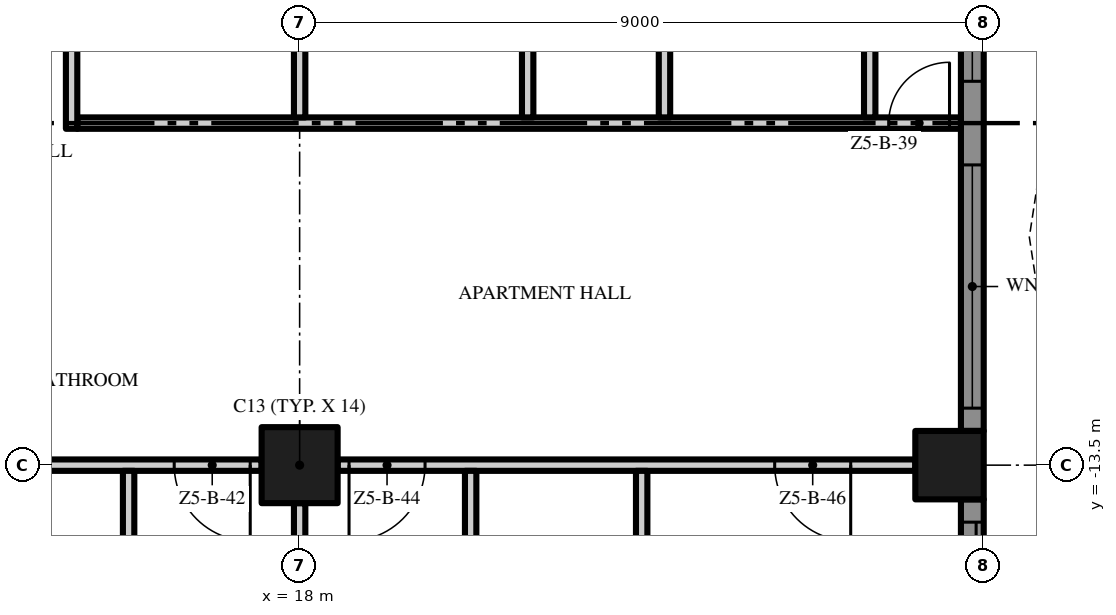
"""IFC4 building model, lengths in metres.
Left out: names, types, materials, properties, quantities, classifications, styles, units other than length and angle.
Written with IfcOpenShell. Run it as: python <this file> out.ifc"""

import sys

from ifc_helpers import new_model, si_unit, direction, frame, frame_2d, origin, origin_2d, place, context, subcontext, project, spatial, polyline, rectangle, outline, extrude, element, fill, save


model = new_model("IFC4")
c1 = context("Model", 3, precision=1e-05, world=origin(), true_north=direction((0.0, 1.0)))
c2 = subcontext(c1, "Body", "Model", "MODEL_VIEW")
j1 = project(units=[si_unit("LENGTHUNIT", "METRE"), si_unit("PLANEANGLEUNIT", "RADIAN")], contexts=[c1])
p1 = place(None, origin())
s1 = spatial("IfcSite", under=j1, at=p1, CompositionType="ELEMENT")
p2 = place(p1, origin())
s2 = spatial("IfcBuilding", under=s1, at=p2, CompositionType="ELEMENT")
p3 = place(p2, frame((0.0, 0.0, 250.2)))
s3 = spatial("IfcBuildingStorey", under=s2, at=p3, CompositionType="ELEMENT", Elevation=250.2)
p4 = place(p3, frame((18.0, -13.5, 0.0), z_axis=(0.0, 0.0, 1.0), x_axis=(1.0, 0.0, 0.0)))
e1 = element("IfcColumn", 1, at=p4, inside=s3, PredefinedType="COLUMN", context=c2, shape_type="SweptSolid", body=[
    extrude(rectangle(XDim=1.0, YDim=1.0, at=origin_2d()), origin(), (0.0, 0.0, 1.0), 3.5),
])
p5 = place(p3, frame((26.55, -13.5, 0.0), z_axis=(0.0, 0.0, 1.0), x_axis=(1.0, 0.0, 0.0)))
e2 = element("IfcColumn", 2, at=p5, inside=s3, PredefinedType="COLUMN", context=c2, shape_type="SweptSolid", body=[
    extrude(rectangle(XDim=0.9, YDim=0.9, at=origin_2d()), origin(), (0.0, 0.0, 1.0), 3.5),
])
p6 = place(p3, frame((26.85, -13.95, 0.0), z_axis=(0.0, 0.0, 1.0), x_axis=(0.0, -1.0, 0.0)))
e3 = element("IfcWall", 3, at=p6, inside=s3, PredefinedType="SOLIDWALL", context=c2, shape_type="SweptSolid", body=[
    extrude(rectangle(XDim=3.75, YDim=0.3, at=frame_2d((1.875, 0.0))), origin(), (0.0, 0.0, 1.0), 3.5),
])
p7 = place(p6, frame((0.3, 0.0, 0.0)))
e4 = element("IfcOpeningElement", 4, at=p7, cuts=e3, PredefinedType="OPENING", context=c2, shape_type="SweptSolid", body=[
    extrude(rectangle(XDim=3.15, YDim=2.4, at=frame_2d((1.575, 1.2))), frame((0.0, 0.16, 0.0), z_axis=(0.0, -1.0, 0.0), x_axis=(1.0, 0.0, 0.0)), (0.0, 0.0, 1.0), 0.32),
])
p8 = place(p3, frame((26.85, -4.95, 0.0), z_axis=(0.0, 0.0, 1.0), x_axis=(0.0, -1.0, 0.0)))
e5 = element("IfcWall", 5, at=p8, inside=s3, PredefinedType="SOLIDWALL", context=c2, shape_type="SweptSolid", body=[
    extrude(rectangle(XDim=8.1, YDim=0.3, at=frame_2d((4.05, 0.0))), origin(), (0.0, 0.0, 1.0), 3.5),
])
p9 = place(p8, frame((4.6, 0.0, 0.45)))
e6 = element("IfcOpeningElement", 6, at=p9, cuts=e5, PredefinedType="OPENING", context=c2, shape_type="SweptSolid", body=[
    extrude(rectangle(XDim=3.2, YDim=2.65, at=frame_2d((1.6, 1.325))), frame((0.0, 0.16, 0.0), z_axis=(0.0, -1.0, 0.0), x_axis=(1.0, 0.0, 0.0)), (0.0, 0.0, 1.0), 0.32),
])
p10 = place(p8, frame((0.3, 0.0, 0.45)))
e7 = element("IfcOpeningElement", 7, at=p10, cuts=e5, PredefinedType="OPENING", context=c2, shape_type="SweptSolid", body=[
    extrude(rectangle(XDim=3.2, YDim=2.65, at=frame_2d((1.6, 1.325))), frame((0.0, 0.16, 0.0), z_axis=(0.0, -1.0, 0.0), x_axis=(1.0, 0.0, 0.0)), (0.0, 0.0, 1.0), 0.32),
])
p11 = place(p3, origin())
e8 = element("IfcWall", 8, at=p11, inside=s3, PredefinedType="USERDEFINED", context=c2, shape_type="SweptSolid", body=[
    extrude(outline(polyline([(30.0, -18.0), (29.771, -16.5), (29.171, -15.0), (28.429, -13.5), (27.829, -12.0), (27.6, -10.5), (27.829, -9.0), (28.429, -7.5), (29.171, -6.0), (29.771, -4.5), (30.0, -3.0), (29.771, -1.5), (29.171, 0.0), (28.429, 1.5), (27.829, 3.0), (27.6, 4.5), (27.829, 6.0), (28.429, 7.5), (29.171, 9.0), (29.771, 10.5), (30.0, 12.0), (29.771, 13.5), (29.171, 15.0), (28.429, 16.5), (27.829, 18.0), (27.597, 17.907), (28.201, 16.398), (28.942, 14.898), (29.528, 13.434), (29.747, 12.0), (29.528, 10.566), (28.942, 9.102), (28.201, 7.602), (27.586, 6.066), (27.347, 4.5), (27.586, 2.934), (28.201, 1.398), (28.942, -0.102), (29.528, -1.566), (29.747, -3.0), (29.528, -4.434), (28.942, -5.898), (28.201, -7.398), (27.586, -8.934), (27.347, -10.5), (27.586, -12.066), (28.201, -13.602), (28.942, -15.102), (29.528, -16.566), (29.753, -18.038), (30.0, -18.0)])), origin(), (0.0, 0.0, 1.0), 0.9),
])
p12 = place(p3, frame((17.5, -13.5, 0.0), z_axis=(0.0, 0.0, 1.0), x_axis=(-1.0, 0.0, 0.0)))
e9 = element("IfcWall", 9, at=p12, inside=s3, PredefinedType="PARTITIONING", context=c2, shape_type="SweptSolid", body=[
    extrude(rectangle(XDim=8.0, YDim=0.15, at=frame_2d((4.0, 0.0))), origin(), (0.0, 0.0, 1.0), 3.5),
])
p13 = place(p12, frame((6.05, 0.0, 0.0)))
e10 = element("IfcOpeningElement", 10, at=p13, cuts=e9, PredefinedType="OPENING", context=c2, shape_type="SweptSolid", body=[
    extrude(rectangle(XDim=1.8, YDim=2.4, at=frame_2d((0.9, 1.2))), frame((0.0, 0.085, 0.0), z_axis=(0.0, -1.0, 0.0), x_axis=(1.0, 0.0, 0.0)), (0.0, 0.0, 1.0), 0.17),
])
p14 = place(p12, frame((0.15, 0.0, 0.0)))
e11 = element("IfcOpeningElement", 11, at=p14, cuts=e9, PredefinedType="OPENING", context=c2, shape_type="SweptSolid", body=[
    extrude(rectangle(XDim=1.0, YDim=2.4, at=frame_2d((0.5, 1.2))), frame((0.0, 0.085, 0.0), z_axis=(0.0, -1.0, 0.0), x_axis=(1.0, 0.0, 0.0)), (0.0, 0.0, 1.0), 0.17),
])
p15 = place(p3, frame((26.1, -13.5, 0.0), z_axis=(0.0, 0.0, 1.0), x_axis=(-1.0, 0.0, 0.0)))
e12 = element("IfcWall", 12, at=p15, inside=s3, PredefinedType="PARTITIONING", context=c2, shape_type="SweptSolid", body=[
    extrude(rectangle(XDim=7.6, YDim=0.15, at=frame_2d((3.8, 0.0))), origin(), (0.0, 0.0, 1.0), 3.5),
])
p16 = place(p15, frame((6.45, 0.0, 0.0)))
e13 = element("IfcOpeningElement", 13, at=p16, cuts=e12, PredefinedType="OPENING", context=c2, shape_type="SweptSolid", body=[
    extrude(rectangle(XDim=1.0, YDim=2.4, at=frame_2d((0.5, 1.2))), frame((0.0, 0.085, 0.0), z_axis=(0.0, -1.0, 0.0), x_axis=(1.0, 0.0, 0.0)), (0.0, 0.0, 1.0), 0.17),
])
p17 = place(p15, frame((0.85, 0.0, 0.0)))
e14 = element("IfcOpeningElement", 14, at=p17, cuts=e12, PredefinedType="OPENING", context=c2, shape_type="SweptSolid", body=[
    extrude(rectangle(XDim=1.0, YDim=2.4, at=frame_2d((0.5, 1.2))), frame((0.0, 0.085, 0.0), z_axis=(0.0, -1.0, 0.0), x_axis=(1.0, 0.0, 0.0)), (0.0, 0.0, 1.0), 0.17),
])
p18 = place(p3, frame((15.075, -9.0, 0.0), z_axis=(0.0, 0.0, 1.0), x_axis=(1.0, 0.0, 0.0)))
e15 = element("IfcWall", 15, at=p18, inside=s3, PredefinedType="PARTITIONING", context=c2, shape_type="SweptSolid", body=[
    extrude(rectangle(XDim=11.625, YDim=0.15, at=frame_2d((5.812, 0.0))), origin(), (0.0, 0.0, 1.0), 3.5),
])
p19 = place(p18, frame((10.675, 0.0, 0.0)))
e16 = element("IfcOpeningElement", 16, at=p19, cuts=e15, PredefinedType="OPENING", context=c2, shape_type="SweptSolid", body=[
    extrude(rectangle(XDim=0.8, YDim=2.0, at=frame_2d((0.4, 1.0))), frame((0.0, 0.085, 0.0), z_axis=(0.0, -1.0, 0.0), x_axis=(1.0, 0.0, 0.0)), (0.0, 0.0, 1.0), 0.17),
])
p20 = place(p3, frame((15.0, -9.075, 0.0), z_axis=(0.0, 0.0, 1.0), x_axis=(0.0, 1.0, 0.0)))
e17 = element("IfcWall", 17, at=p20, inside=s3, PredefinedType="PARTITIONING", context=c2, shape_type="SweptSolid", body=[
    extrude(rectangle(XDim=4.65, YDim=0.15, at=frame_2d((2.325, 0.0))), origin(), (0.0, 0.0, 1.0), 3.5),
])
p21 = place(p3, frame((15.75, -16.575, 0.0), z_axis=(0.0, 0.0, 1.0), x_axis=(0.0, 1.0, 0.0)))
e18 = element("IfcWall", 18, at=p21, inside=s3, PredefinedType="PARTITIONING", context=c2, shape_type="SweptSolid", body=[
    extrude(rectangle(XDim=3.0, YDim=0.15, at=frame_2d((1.5, 0.0))), origin(), (0.0, 0.0, 1.0), 3.5),
])
p22 = place(p3, frame((18.0, -21.6, 0.0), z_axis=(0.0, 0.0, 1.0), x_axis=(0.0, 1.0, 0.0)))
e19 = element("IfcWall", 19, at=p22, inside=s3, PredefinedType="PARTITIONING", context=c2, shape_type="SweptSolid", body=[
    extrude(rectangle(XDim=7.6, YDim=0.15, at=frame_2d((3.8, 0.0))), origin(), (0.0, 0.0, 1.0), 3.5),
])
p23 = place(p3, frame((18.0, -8.925, 0.0), z_axis=(0.0, 0.0, 1.0), x_axis=(0.0, 1.0, 0.0)))
e20 = element("IfcWall", 20, at=p23, inside=s3, PredefinedType="PARTITIONING", context=c2, shape_type="SweptSolid", body=[
    extrude(rectangle(XDim=3.925, YDim=0.15, at=frame_2d((1.962, 0.0))), origin(), (0.0, 0.0, 1.0), 3.5),
])
p24 = place(p3, frame((20.25, -16.575, 0.0), z_axis=(0.0, 0.0, 1.0), x_axis=(0.0, 1.0, 0.0)))
e21 = element("IfcWall", 21, at=p24, inside=s3, PredefinedType="PARTITIONING", context=c2, shape_type="SweptSolid", body=[
    extrude(rectangle(XDim=3.0, YDim=0.15, at=frame_2d((1.5, 0.0))), origin(), (0.0, 0.0, 1.0), 3.5),
])
p25 = place(p3, frame((21.0, -8.925, 0.0), z_axis=(0.0, 0.0, 1.0), x_axis=(0.0, 1.0, 0.0)))
e22 = element("IfcWall", 22, at=p25, inside=s3, PredefinedType="PARTITIONING", context=c2, shape_type="SweptSolid", body=[
    extrude(rectangle(XDim=4.35, YDim=0.15, at=frame_2d((2.175, 0.0))), origin(), (0.0, 0.0, 1.0), 3.5),
])
p26 = place(p3, frame((22.5, -17.55, 0.0), z_axis=(0.0, 0.0, 1.0), x_axis=(0.0, 1.0, 0.0)))
e23 = element("IfcWall", 23, at=p26, inside=s3, PredefinedType="PARTITIONING", context=c2, shape_type="SweptSolid", body=[
    extrude(rectangle(XDim=3.975, YDim=0.15, at=frame_2d((1.988, 0.0))), origin(), (0.0, 0.0, 1.0), 3.5),
])
for number, where, z_axis, x_axis in (
    (24, (22.8, -8.925, 0.0), (0.0, 0.0, 1.0), (0.0, 1.0, 0.0)),
    (25, (25.5, -8.925, 0.0), (0.0, 0.0, 1.0), (0.0, 1.0, 0.0)),
):
    element("IfcWall", number, at=place(p3, frame(where, z_axis=z_axis, x_axis=x_axis)), inside=s3, PredefinedType="PARTITIONING", context=c2, shape_type="SweptSolid", body=[
        extrude(rectangle(XDim=4.35, YDim=0.15, at=frame_2d((2.175, 0.0))), origin(), (0.0, 0.0, 1.0), 3.5),
    ])
p27 = place(p7, origin())
e26 = element("IfcDoor", 26, at=p27, inside=s3, OperationType="SINGLE_SWING_LEFT", PredefinedType="DOOR", context=c2, shape_type="SweptSolid", body=[
    extrude(rectangle(XDim=3.15, YDim=2.4, at=frame_2d((1.575, 1.2))), frame((0.0, 0.025, 0.0), z_axis=(0.0, -1.0, 0.0), x_axis=(1.0, 0.0, 0.0)), (0.0, 0.0, 1.0), 0.05),
])
fill(e4, e26)
p28 = place(p9, origin())
e27 = element("IfcWindow", 27, at=p28, inside=s3, PartitioningType="SINGLE_PANEL", PredefinedType="WINDOW", context=c2, shape_type="SweptSolid", body=[
    extrude(rectangle(XDim=3.2, YDim=2.65, at=frame_2d((1.6, 1.325))), frame((0.0, 0.03, 0.0), z_axis=(0.0, -1.0, 0.0), x_axis=(1.0, 0.0, 0.0)), (0.0, 0.0, 1.0), 0.06),
])
fill(e6, e27)
p29 = place(p10, origin())
e28 = element("IfcWindow", 28, at=p29, inside=s3, PartitioningType="SINGLE_PANEL", PredefinedType="WINDOW", context=c2, shape_type="SweptSolid", body=[
    extrude(rectangle(XDim=3.2, YDim=2.65, at=frame_2d((1.6, 1.325))), frame((0.0, 0.03, 0.0), z_axis=(0.0, -1.0, 0.0), x_axis=(1.0, 0.0, 0.0)), (0.0, 0.0, 1.0), 0.06),
])
fill(e7, e28)
p30 = place(p19, origin())
e29 = element("IfcDoor", 29, at=p30, inside=s3, OperationType="SINGLE_SWING_RIGHT", PredefinedType="DOOR", context=c2, shape_type="SweptSolid", body=[
    extrude(rectangle(XDim=0.8, YDim=2.0, at=frame_2d((0.4, 1.0))), frame((0.0, 0.025, 0.0), z_axis=(0.0, -1.0, 0.0), x_axis=(1.0, 0.0, 0.0)), (0.0, 0.0, 1.0), 0.05),
])
fill(e16, e29)
p31 = place(p14, origin())
e30 = element("IfcDoor", 30, at=p31, inside=s3, OperationType="SINGLE_SWING_LEFT", PredefinedType="DOOR", context=c2, shape_type="SweptSolid", body=[
    extrude(rectangle(XDim=1.0, YDim=2.4, at=frame_2d((0.5, 1.2))), frame((0.0, 0.025, 0.0), z_axis=(0.0, -1.0, 0.0), x_axis=(1.0, 0.0, 0.0)), (0.0, 0.0, 1.0), 0.05),
])
fill(e11, e30)
p32 = place(p16, origin())
e31 = element("IfcDoor", 31, at=p32, inside=s3, OperationType="SINGLE_SWING_RIGHT", PredefinedType="DOOR", context=c2, shape_type="SweptSolid", body=[
    extrude(rectangle(XDim=1.0, YDim=2.4, at=frame_2d((0.5, 1.2))), frame((0.0, 0.025, 0.0), z_axis=(0.0, -1.0, 0.0), x_axis=(1.0, 0.0, 0.0)), (0.0, 0.0, 1.0), 0.05),
])
fill(e13, e31)
p33 = place(p17, origin())
e32 = element("IfcDoor", 32, at=p33, inside=s3, OperationType="SINGLE_SWING_LEFT", PredefinedType="DOOR", context=c2, shape_type="SweptSolid", body=[
    extrude(rectangle(XDim=1.0, YDim=2.4, at=frame_2d((0.5, 1.2))), frame((0.0, 0.025, 0.0), z_axis=(0.0, -1.0, 0.0), x_axis=(1.0, 0.0, 0.0)), (0.0, 0.0, 1.0), 0.05),
])
fill(e14, e32)
save(model, sys.argv[1])
